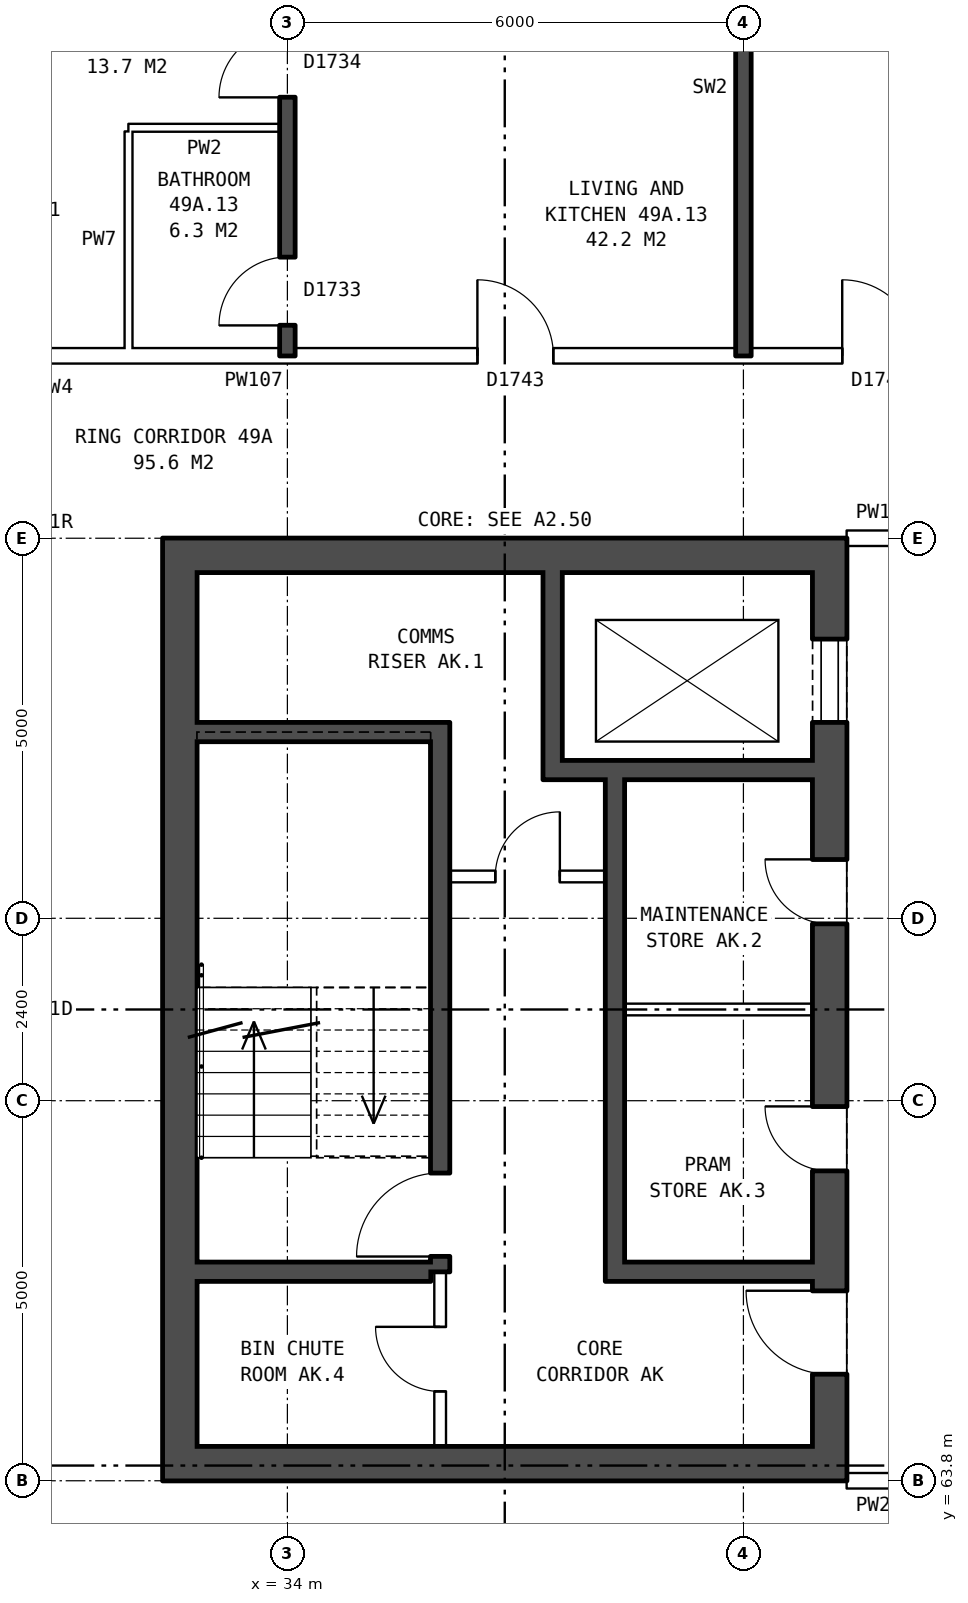
"""IFC4 building model, lengths in metres.
Left out: names, types, materials, properties, quantities, classifications, styles, units other than length and angle.
Written with IfcOpenShell. Run it as: python <this file> out.ifc"""

import sys

from ifc_helpers import new_model, si_unit, direction, frame, frame_2d, origin, place, context, subcontext, project, spatial, rectangle, extrude, element, fill, save


model = new_model("IFC4")
c1 = context("Model", 3, precision=1e-05, world=origin(), true_north=direction((0.0, 1.0)))
c2 = subcontext(c1, "Body", "Model", "MODEL_VIEW")
j1 = project(units=[si_unit("LENGTHUNIT", "METRE"), si_unit("PLANEANGLEUNIT", "RADIAN")], contexts=[c1])
p1 = place(None, origin())
s1 = spatial("IfcSite", under=j1, at=p1, CompositionType="ELEMENT")
p2 = place(p1, origin())
s2 = spatial("IfcBuilding", under=s1, at=p2, CompositionType="ELEMENT")
p3 = place(p2, frame((0.0, 0.0, 175.8)))
s3 = spatial("IfcBuildingStorey", under=s2, at=p3, CompositionType="ELEMENT", Elevation=175.8)
p4 = place(p3, frame((41.135, 76.2, 0.0), z_axis=(0.0, 0.0, 1.0), x_axis=(0.0, -1.0, 0.0)))
e1 = element("IfcWall", 1, at=p4, inside=s3, PredefinedType="SHEAR", context=c2, shape_type="SweptSolid", body=[
    extrude(rectangle(XDim=12.4, YDim=0.45, at=frame_2d((6.2, 0.0))), origin(), (0.0, 0.0, 1.0), 2.85),
])
p5 = place(p4, frame((1.325, 0.0, 0.0)))
e2 = element("IfcOpeningElement", 2, at=p5, cuts=e1, PredefinedType="OPENING", context=c2, shape_type="SweptSolid", body=[
    extrude(rectangle(XDim=1.1, YDim=2.1, at=frame_2d((0.55, 1.05))), frame((0.0, 0.235, 0.0), z_axis=(0.0, -1.0, 0.0), x_axis=(1.0, 0.0, 0.0)), (0.0, 0.0, 1.0), 0.47),
])
p6 = place(p4, frame((4.225, 0.0, 0.0)))
e3 = element("IfcOpeningElement", 3, at=p6, cuts=e1, PredefinedType="OPENING", context=c2, shape_type="SweptSolid", body=[
    extrude(rectangle(XDim=0.85, YDim=2.1, at=frame_2d((0.425, 1.05))), frame((0.0, 0.235, 0.0), z_axis=(0.0, -1.0, 0.0), x_axis=(1.0, 0.0, 0.0)), (0.0, 0.0, 1.0), 0.47),
])
p7 = place(p4, frame((7.475, 0.0, 0.0)))
e4 = element("IfcOpeningElement", 4, at=p7, cuts=e1, PredefinedType="OPENING", context=c2, shape_type="SweptSolid", body=[
    extrude(rectangle(XDim=0.85, YDim=2.1, at=frame_2d((0.425, 1.05))), frame((0.0, 0.235, 0.0), z_axis=(0.0, -1.0, 0.0), x_axis=(1.0, 0.0, 0.0)), (0.0, 0.0, 1.0), 0.47),
])
p8 = place(p4, frame((9.9, 0.0, 0.0)))
e5 = element("IfcOpeningElement", 5, at=p8, cuts=e1, PredefinedType="OPENING", context=c2, shape_type="SweptSolid", body=[
    extrude(rectangle(XDim=1.1, YDim=2.1, at=frame_2d((0.55, 1.05))), frame((0.0, 0.235, 0.0), z_axis=(0.0, -1.0, 0.0), x_axis=(1.0, 0.0, 0.0)), (0.0, 0.0, 1.0), 0.47),
])
p9 = place(p3, frame((32.585, 76.2, 0.0), z_axis=(0.0, 0.0, 1.0), x_axis=(0.0, -1.0, 0.0)))
e6 = element("IfcWall", 6, at=p9, inside=s3, PredefinedType="SHEAR", context=c2, shape_type="SweptSolid", body=[
    extrude(rectangle(XDim=12.4, YDim=0.45, at=frame_2d((6.2, 0.0))), origin(), (0.0, 0.0, 1.0), 2.85),
])
for number, where, z_axis, x_axis in (
    (7, (40.91, 75.975, 0.0), (0.0, 0.0, 1.0), (-1.0, 0.0, 0.0)),
    (8, (40.91, 64.025, 0.0), (0.0, 0.0, 1.0), (-1.0, 0.0, 0.0)),
):
    element("IfcWall", number, at=place(p3, frame(where, z_axis=z_axis, x_axis=x_axis)), inside=s3, PredefinedType="SHEAR", context=c2, shape_type="SweptSolid", body=[
        extrude(rectangle(XDim=8.1, YDim=0.45, at=frame_2d((4.05, 0.0))), origin(), (0.0, 0.0, 1.0), 2.85),
    ])
p10 = place(p3, frame((35.885, 73.65, 0.0), z_axis=(0.0, 0.0, 1.0), x_axis=(-1.0, 0.0, 0.0)))
e9 = element("IfcWall", 9, at=p10, inside=s3, PredefinedType="SHEAR", context=c2, shape_type="SweptSolid", body=[
    extrude(rectangle(XDim=3.075, YDim=0.25, at=frame_2d((1.538, 0.0))), origin(), (0.0, 0.0, 1.0), 2.85),
])
p11 = place(p3, frame((40.91, 73.15, 0.0), z_axis=(0.0, 0.0, 1.0), x_axis=(-1.0, 0.0, 0.0)))
e10 = element("IfcWall", 10, at=p11, inside=s3, PredefinedType="SHEAR", context=c2, shape_type="SweptSolid", body=[
    extrude(rectangle(XDim=3.545, YDim=0.25, at=frame_2d((1.772, 0.0))), origin(), (0.0, 0.0, 1.0), 2.85),
])
p12 = place(p3, frame((38.185, 71.75, 0.0), z_axis=(0.0, 0.0, 1.0), x_axis=(-1.0, 0.0, 0.0)))
e11 = element("IfcWall", 11, at=p12, inside=s3, PredefinedType="PARTITIONING", context=c2, shape_type="SweptSolid", body=[
    extrude(rectangle(XDim=2.05, YDim=0.15, at=frame_2d((1.025, 0.0))), origin(), (0.0, 0.0, 1.0), 2.85),
])
p13 = place(p12, frame((0.6, 0.0, 0.0)))
e12 = element("IfcOpeningElement", 12, at=p13, cuts=e11, PredefinedType="OPENING", context=c2, shape_type="SweptSolid", body=[
    extrude(rectangle(XDim=0.85, YDim=2.1, at=frame_2d((0.425, 1.05))), frame((0.0, 0.085, 0.0), z_axis=(0.0, -1.0, 0.0), x_axis=(1.0, 0.0, 0.0)), (0.0, 0.0, 1.0), 0.17),
])
p14 = place(p3, frame((40.91, 70.0, 0.0), z_axis=(0.0, 0.0, 1.0), x_axis=(-1.0, 0.0, 0.0)))
e13 = element("IfcWall", 13, at=p14, inside=s3, PredefinedType="PARTITIONING", context=c2, shape_type="SweptSolid", body=[
    extrude(rectangle(XDim=2.475, YDim=0.15, at=frame_2d((1.237, 0.0))), origin(), (0.0, 0.0, 1.0), 2.85),
])
p15 = place(p3, frame((40.91, 66.55, 0.0), z_axis=(0.0, 0.0, 1.0), x_axis=(-1.0, 0.0, 0.0)))
e14 = element("IfcWall", 14, at=p15, inside=s3, PredefinedType="SHEAR", context=c2, shape_type="SweptSolid", body=[
    extrude(rectangle(XDim=2.475, YDim=0.25, at=frame_2d((1.237, 0.0))), origin(), (0.0, 0.0, 1.0), 2.85),
])
p16 = place(p3, frame((35.885, 66.55, 0.0), z_axis=(0.0, 0.0, 1.0), x_axis=(-1.0, 0.0, 0.0)))
e15 = element("IfcWall", 15, at=p16, inside=s3, PredefinedType="SHEAR", context=c2, shape_type="SweptSolid", body=[
    extrude(rectangle(XDim=3.075, YDim=0.25, at=frame_2d((1.538, 0.0))), origin(), (0.0, 0.0, 1.0), 2.85),
])
p17 = place(p3, frame((38.31, 73.025, 0.0), z_axis=(0.0, 0.0, 1.0), x_axis=(0.0, -1.0, 0.0)))
e16 = element("IfcWall", 16, at=p17, inside=s3, PredefinedType="SHEAR", context=c2, shape_type="SweptSolid", body=[
    extrude(rectangle(XDim=6.6, YDim=0.25, at=frame_2d((3.3, 0.0))), origin(), (0.0, 0.0, 1.0), 2.85),
])
p18 = place(p3, frame((37.49, 75.75, 0.0), z_axis=(0.0, 0.0, 1.0), x_axis=(0.0, -1.0, 0.0)))
e17 = element("IfcWall", 17, at=p18, inside=s3, PredefinedType="SHEAR", context=c2, shape_type="SweptSolid", body=[
    extrude(rectangle(XDim=2.475, YDim=0.25, at=frame_2d((1.238, 0.0))), origin(), (0.0, 0.0, 1.0), 2.85),
])
p19 = place(p3, frame((36.01, 73.775, 0.0), z_axis=(0.0, 0.0, 1.0), x_axis=(0.0, -1.0, 0.0)))
e18 = element("IfcWall", 18, at=p19, inside=s3, PredefinedType="SHEAR", context=c2, shape_type="SweptSolid", body=[
    extrude(rectangle(XDim=7.225, YDim=0.25, at=frame_2d((3.612, 0.0))), origin(), (0.0, 0.0, 1.0), 2.85),
])
p20 = place(p19, frame((5.925, 0.0, 0.0)))
e19 = element("IfcOpeningElement", 19, at=p20, cuts=e18, PredefinedType="OPENING", context=c2, shape_type="SweptSolid", body=[
    extrude(rectangle(XDim=1.1, YDim=2.1, at=frame_2d((0.55, 1.05))), frame((0.0, 0.135, 0.0), z_axis=(0.0, -1.0, 0.0), x_axis=(1.0, 0.0, 0.0)), (0.0, 0.0, 1.0), 0.27),
])
p21 = place(p3, frame((36.01, 66.55, 0.0), z_axis=(0.0, 0.0, 1.0), x_axis=(0.0, -1.0, 0.0)))
e20 = element("IfcWall", 20, at=p21, inside=s3, PredefinedType="PARTITIONING", context=c2, shape_type="SweptSolid", body=[
    extrude(rectangle(XDim=2.3, YDim=0.15, at=frame_2d((1.15, 0.0))), origin(), (0.0, 0.0, 1.0), 2.85),
])
p22 = place(p21, frame((0.725, 0.0, 0.0)))
e21 = element("IfcOpeningElement", 21, at=p22, cuts=e20, PredefinedType="OPENING", context=c2, shape_type="SweptSolid", body=[
    extrude(rectangle(XDim=0.85, YDim=2.1, at=frame_2d((0.425, 1.05))), frame((0.0, 0.085, 0.0), z_axis=(0.0, -1.0, 0.0), x_axis=(1.0, 0.0, 0.0)), (0.0, 0.0, 1.0), 0.17),
])
p23 = place(p3, frame((41.36, 63.8, 0.0), z_axis=(0.0, 0.0, 1.0), x_axis=(1.0, 0.0, 0.0)))
e22 = element("IfcWall", 22, at=p23, inside=s3, PredefinedType="PARTITIONING", context=c2, shape_type="SweptSolid", body=[
    extrude(rectangle(XDim=3.0, YDim=0.2, at=frame_2d((1.5, 0.0))), origin(), (0.0, 0.0, 1.0), 2.85),
])
p24 = place(p23, frame((1.0, 0.0, 0.0)))
e23 = element("IfcOpeningElement", 23, at=p24, cuts=e22, PredefinedType="OPENING", context=c2, shape_type="SweptSolid", body=[
    extrude(rectangle(XDim=1.0, YDim=2.1, at=frame_2d((0.5, 1.05))), frame((0.0, 0.11, 0.0), z_axis=(0.0, -1.0, 0.0), x_axis=(1.0, 0.0, 0.0)), (0.0, 0.0, 1.0), 0.22),
])
p25 = place(p3, frame((41.36, 76.2, 0.0), z_axis=(0.0, 0.0, 1.0), x_axis=(1.0, 0.0, 0.0)))
e24 = element("IfcWall", 24, at=p25, inside=s3, PredefinedType="PARTITIONING", context=c2, shape_type="SweptSolid", body=[
    extrude(rectangle(XDim=3.0, YDim=0.2, at=frame_2d((1.5, 0.0))), origin(), (0.0, 0.0, 1.0), 2.85),
])
p26 = place(p25, frame((1.0, 0.0, 0.0)))
e25 = element("IfcOpeningElement", 25, at=p26, cuts=e24, PredefinedType="OPENING", context=c2, shape_type="SweptSolid", body=[
    extrude(rectangle(XDim=1.0, YDim=2.1, at=frame_2d((0.5, 1.05))), frame((0.0, 0.11, 0.0), z_axis=(0.0, -1.0, 0.0), x_axis=(1.0, 0.0, 0.0)), (0.0, 0.0, 1.0), 0.22),
])
p27 = place(p3, frame((30.61, 78.6, 0.0), z_axis=(0.0, 0.0, 1.0), x_axis=(1.0, 0.0, 0.0)))
e26 = element("IfcWall", 26, at=p27, inside=s3, PredefinedType="PARTITIONING", context=c2, shape_type="SweptSolid", body=[
    extrude(rectangle(XDim=15.29, YDim=0.2, at=frame_2d((7.645, 0.0))), origin(), (0.0, 0.0, 1.0), 2.85),
])
p28 = place(p27, frame((10.69, 0.0, 0.0)))
e27 = element("IfcOpeningElement", 27, at=p28, cuts=e26, PredefinedType="OPENING", context=c2, shape_type="SweptSolid", body=[
    extrude(rectangle(XDim=1.0, YDim=2.1, at=frame_2d((0.5, 1.05))), frame((0.0, 0.11, 0.0), z_axis=(0.0, -1.0, 0.0), x_axis=(1.0, 0.0, 0.0)), (0.0, 0.0, 1.0), 0.22),
])
p29 = place(p27, frame((5.89, 0.0, 0.0)))
e28 = element("IfcOpeningElement", 28, at=p29, cuts=e26, PredefinedType="OPENING", context=c2, shape_type="SweptSolid", body=[
    extrude(rectangle(XDim=1.0, YDim=2.1, at=frame_2d((0.5, 1.05))), frame((0.0, 0.11, 0.0), z_axis=(0.0, -1.0, 0.0), x_axis=(1.0, 0.0, 0.0)), (0.0, 0.0, 1.0), 0.22),
])
p30 = place(p3, frame((31.91, 81.6, 0.0), z_axis=(0.0, 0.0, 1.0), x_axis=(1.0, 0.0, 0.0)))
e29 = element("IfcWall", 29, at=p30, inside=s3, PredefinedType="PARTITIONING", context=c2, shape_type="SweptSolid", body=[
    extrude(rectangle(XDim=1.99, YDim=0.1, at=frame_2d((0.995, 0.0))), origin(), (0.0, 0.0, 1.0), 2.85),
])
p31 = place(p3, frame((31.91, 78.7, 0.0), z_axis=(0.0, 0.0, 1.0), x_axis=(0.0, 1.0, 0.0)))
e30 = element("IfcWall", 30, at=p31, inside=s3, PredefinedType="PARTITIONING", context=c2, shape_type="SweptSolid", body=[
    extrude(rectangle(XDim=2.85, YDim=0.1, at=frame_2d((1.425, 0.0))), origin(), (0.0, 0.0, 1.0), 2.85),
])
p32 = place(p3, frame((34.0, 78.6, 0.0), z_axis=(0.0, 0.0, 1.0), x_axis=(0.0, 1.0, 0.0)))
e31 = element("IfcWall", 31, at=p32, inside=s3, PredefinedType="SOLIDWALL", context=c2, shape_type="SweptSolid", body=[
    extrude(rectangle(XDim=7.04, YDim=0.2, at=frame_2d((3.52, 0.0))), origin(), (0.0, 0.0, 1.0), 2.85),
])
p33 = place(p32, frame((3.4, 0.0, 0.0)))
e32 = element("IfcOpeningElement", 32, at=p33, cuts=e31, PredefinedType="OPENING", context=c2, shape_type="SweptSolid", body=[
    extrude(rectangle(XDim=0.9, YDim=2.1, at=frame_2d((0.45, 1.05))), frame((0.0, 0.11, 0.0), z_axis=(0.0, -1.0, 0.0), x_axis=(1.0, 0.0, 0.0)), (0.0, 0.0, 1.0), 0.22),
])
p34 = place(p32, frame((0.4, 0.0, 0.0)))
e33 = element("IfcOpeningElement", 33, at=p34, cuts=e31, PredefinedType="OPENING", context=c2, shape_type="SweptSolid", body=[
    extrude(rectangle(XDim=0.9, YDim=2.1, at=frame_2d((0.45, 1.05))), frame((0.0, 0.11, 0.0), z_axis=(0.0, -1.0, 0.0), x_axis=(1.0, 0.0, 0.0)), (0.0, 0.0, 1.0), 0.22),
])
p35 = place(p3, frame((40.0, 78.6, 0.0), z_axis=(0.0, 0.0, 1.0), x_axis=(0.0, 1.0, 0.0)))
e34 = element("IfcWall", 34, at=p35, inside=s3, PredefinedType="SOLIDWALL", context=c2, shape_type="SweptSolid", body=[
    extrude(rectangle(XDim=7.04, YDim=0.2, at=frame_2d((3.52, 0.0))), origin(), (0.0, 0.0, 1.0), 2.85),
])
p36 = place(p5, origin())
e35 = element("IfcDoor", 35, at=p36, inside=s3, OperationType="DOUBLE_DOOR_SLIDING", PredefinedType="DOOR", context=c2, shape_type="SweptSolid", body=[
    extrude(rectangle(XDim=1.1, YDim=2.1, at=frame_2d((0.55, 1.05))), frame((0.0, -0.16, 0.0), z_axis=(0.0, -1.0, 0.0), x_axis=(1.0, 0.0, 0.0)), (0.0, 0.0, 1.0), 0.05),
])
fill(e2, e35)
p37 = place(p6, frame((0.85, 0.0, 0.0), z_axis=(0.0, 0.0, 1.0), x_axis=(-1.0, 0.0, 0.0)))
e36 = element("IfcDoor", 36, at=p37, inside=s3, OperationType="SINGLE_SWING_RIGHT", PredefinedType="DOOR", context=c2, shape_type="SweptSolid", body=[
    extrude(rectangle(XDim=0.85, YDim=2.1, at=frame_2d((0.425, 1.05))), frame((0.0, 0.21, 0.0), z_axis=(0.0, -1.0, 0.0), x_axis=(1.0, 0.0, 0.0)), (0.0, 0.0, 1.0), 0.05),
])
fill(e3, e36)
p38 = place(p7, frame((0.85, 0.0, 0.0), z_axis=(0.0, 0.0, 1.0), x_axis=(-1.0, 0.0, 0.0)))
e37 = element("IfcDoor", 37, at=p38, inside=s3, OperationType="SINGLE_SWING_RIGHT", PredefinedType="DOOR", context=c2, shape_type="SweptSolid", body=[
    extrude(rectangle(XDim=0.85, YDim=2.1, at=frame_2d((0.425, 1.05))), frame((0.0, 0.21, 0.0), z_axis=(0.0, -1.0, 0.0), x_axis=(1.0, 0.0, 0.0)), (0.0, 0.0, 1.0), 0.05),
])
fill(e4, e37)
p39 = place(p8, frame((1.1, 0.0, 0.0), z_axis=(0.0, 0.0, 1.0), x_axis=(-1.0, 0.0, 0.0)))
e38 = element("IfcDoor", 38, at=p39, inside=s3, OperationType="SINGLE_SWING_RIGHT", PredefinedType="DOOR", context=c2, shape_type="SweptSolid", body=[
    extrude(rectangle(XDim=1.1, YDim=2.1, at=frame_2d((0.55, 1.05))), frame((0.0, 0.21, 0.0), z_axis=(0.0, -1.0, 0.0), x_axis=(1.0, 0.0, 0.0)), (0.0, 0.0, 1.0), 0.05),
])
fill(e5, e38)
p40 = place(p20, frame((1.1, 0.0, 0.0), z_axis=(0.0, 0.0, 1.0), x_axis=(-1.0, 0.0, 0.0)))
e39 = element("IfcDoor", 39, at=p40, inside=s3, OperationType="SINGLE_SWING_LEFT", PredefinedType="DOOR", context=c2, shape_type="SweptSolid", body=[
    extrude(rectangle(XDim=1.1, YDim=2.1, at=frame_2d((0.55, 1.05))), frame((0.0, 0.025, 0.0), z_axis=(0.0, -1.0, 0.0), x_axis=(1.0, 0.0, 0.0)), (0.0, 0.0, 1.0), 0.05),
])
fill(e19, e39)
p41 = place(p13, frame((0.85, 0.0, 0.0), z_axis=(0.0, 0.0, 1.0), x_axis=(-1.0, 0.0, 0.0)))
e40 = element("IfcDoor", 40, at=p41, inside=s3, OperationType="SINGLE_SWING_RIGHT", PredefinedType="DOOR", context=c2, shape_type="SweptSolid", body=[
    extrude(rectangle(XDim=0.85, YDim=2.1, at=frame_2d((0.425, 1.05))), frame((0.0, 0.025, 0.0), z_axis=(0.0, -1.0, 0.0), x_axis=(1.0, 0.0, 0.0)), (0.0, 0.0, 1.0), 0.05),
])
fill(e12, e40)
p42 = place(p22, frame((0.85, 0.0, 0.0), z_axis=(0.0, 0.0, 1.0), x_axis=(-1.0, 0.0, 0.0)))
e41 = element("IfcDoor", 41, at=p42, inside=s3, OperationType="SINGLE_SWING_RIGHT", PredefinedType="DOOR", context=c2, shape_type="SweptSolid", body=[
    extrude(rectangle(XDim=0.85, YDim=2.1, at=frame_2d((0.425, 1.05))), frame((0.0, 0.025, 0.0), z_axis=(0.0, -1.0, 0.0), x_axis=(1.0, 0.0, 0.0)), (0.0, 0.0, 1.0), 0.05),
])
fill(e21, e41)
p43 = place(p28, origin())
e42 = element("IfcDoor", 42, at=p43, inside=s3, OperationType="SINGLE_SWING_LEFT", PredefinedType="DOOR", context=c2, shape_type="SweptSolid", body=[
    extrude(rectangle(XDim=1.0, YDim=2.1, at=frame_2d((0.5, 1.05))), frame((0.0, 0.025, 0.0), z_axis=(0.0, -1.0, 0.0), x_axis=(1.0, 0.0, 0.0)), (0.0, 0.0, 1.0), 0.05),
])
fill(e27, e42)
p44 = place(p33, origin())
e43 = element("IfcDoor", 43, at=p44, inside=s3, OperationType="SINGLE_SWING_LEFT", PredefinedType="DOOR", context=c2, shape_type="SweptSolid", body=[
    extrude(rectangle(XDim=0.9, YDim=2.1, at=frame_2d((0.45, 1.05))), frame((0.0, 0.025, 0.0), z_axis=(0.0, -1.0, 0.0), x_axis=(1.0, 0.0, 0.0)), (0.0, 0.0, 1.0), 0.05),
])
fill(e32, e43)
p45 = place(p29, origin())
e44 = element("IfcDoor", 44, at=p45, inside=s3, OperationType="SINGLE_SWING_LEFT", PredefinedType="DOOR", context=c2, shape_type="SweptSolid", body=[
    extrude(rectangle(XDim=1.0, YDim=2.1, at=frame_2d((0.5, 1.05))), frame((0.0, 0.025, 0.0), z_axis=(0.0, -1.0, 0.0), x_axis=(1.0, 0.0, 0.0)), (0.0, 0.0, 1.0), 0.05),
])
fill(e28, e44)
p46 = place(p34, origin())
e45 = element("IfcDoor", 45, at=p46, inside=s3, OperationType="SINGLE_SWING_LEFT", PredefinedType="DOOR", context=c2, shape_type="SweptSolid", body=[
    extrude(rectangle(XDim=0.9, YDim=2.1, at=frame_2d((0.45, 1.05))), frame((0.0, 0.025, 0.0), z_axis=(0.0, -1.0, 0.0), x_axis=(1.0, 0.0, 0.0)), (0.0, 0.0, 1.0), 0.05),
])
fill(e33, e45)
save(model, sys.argv[1])
